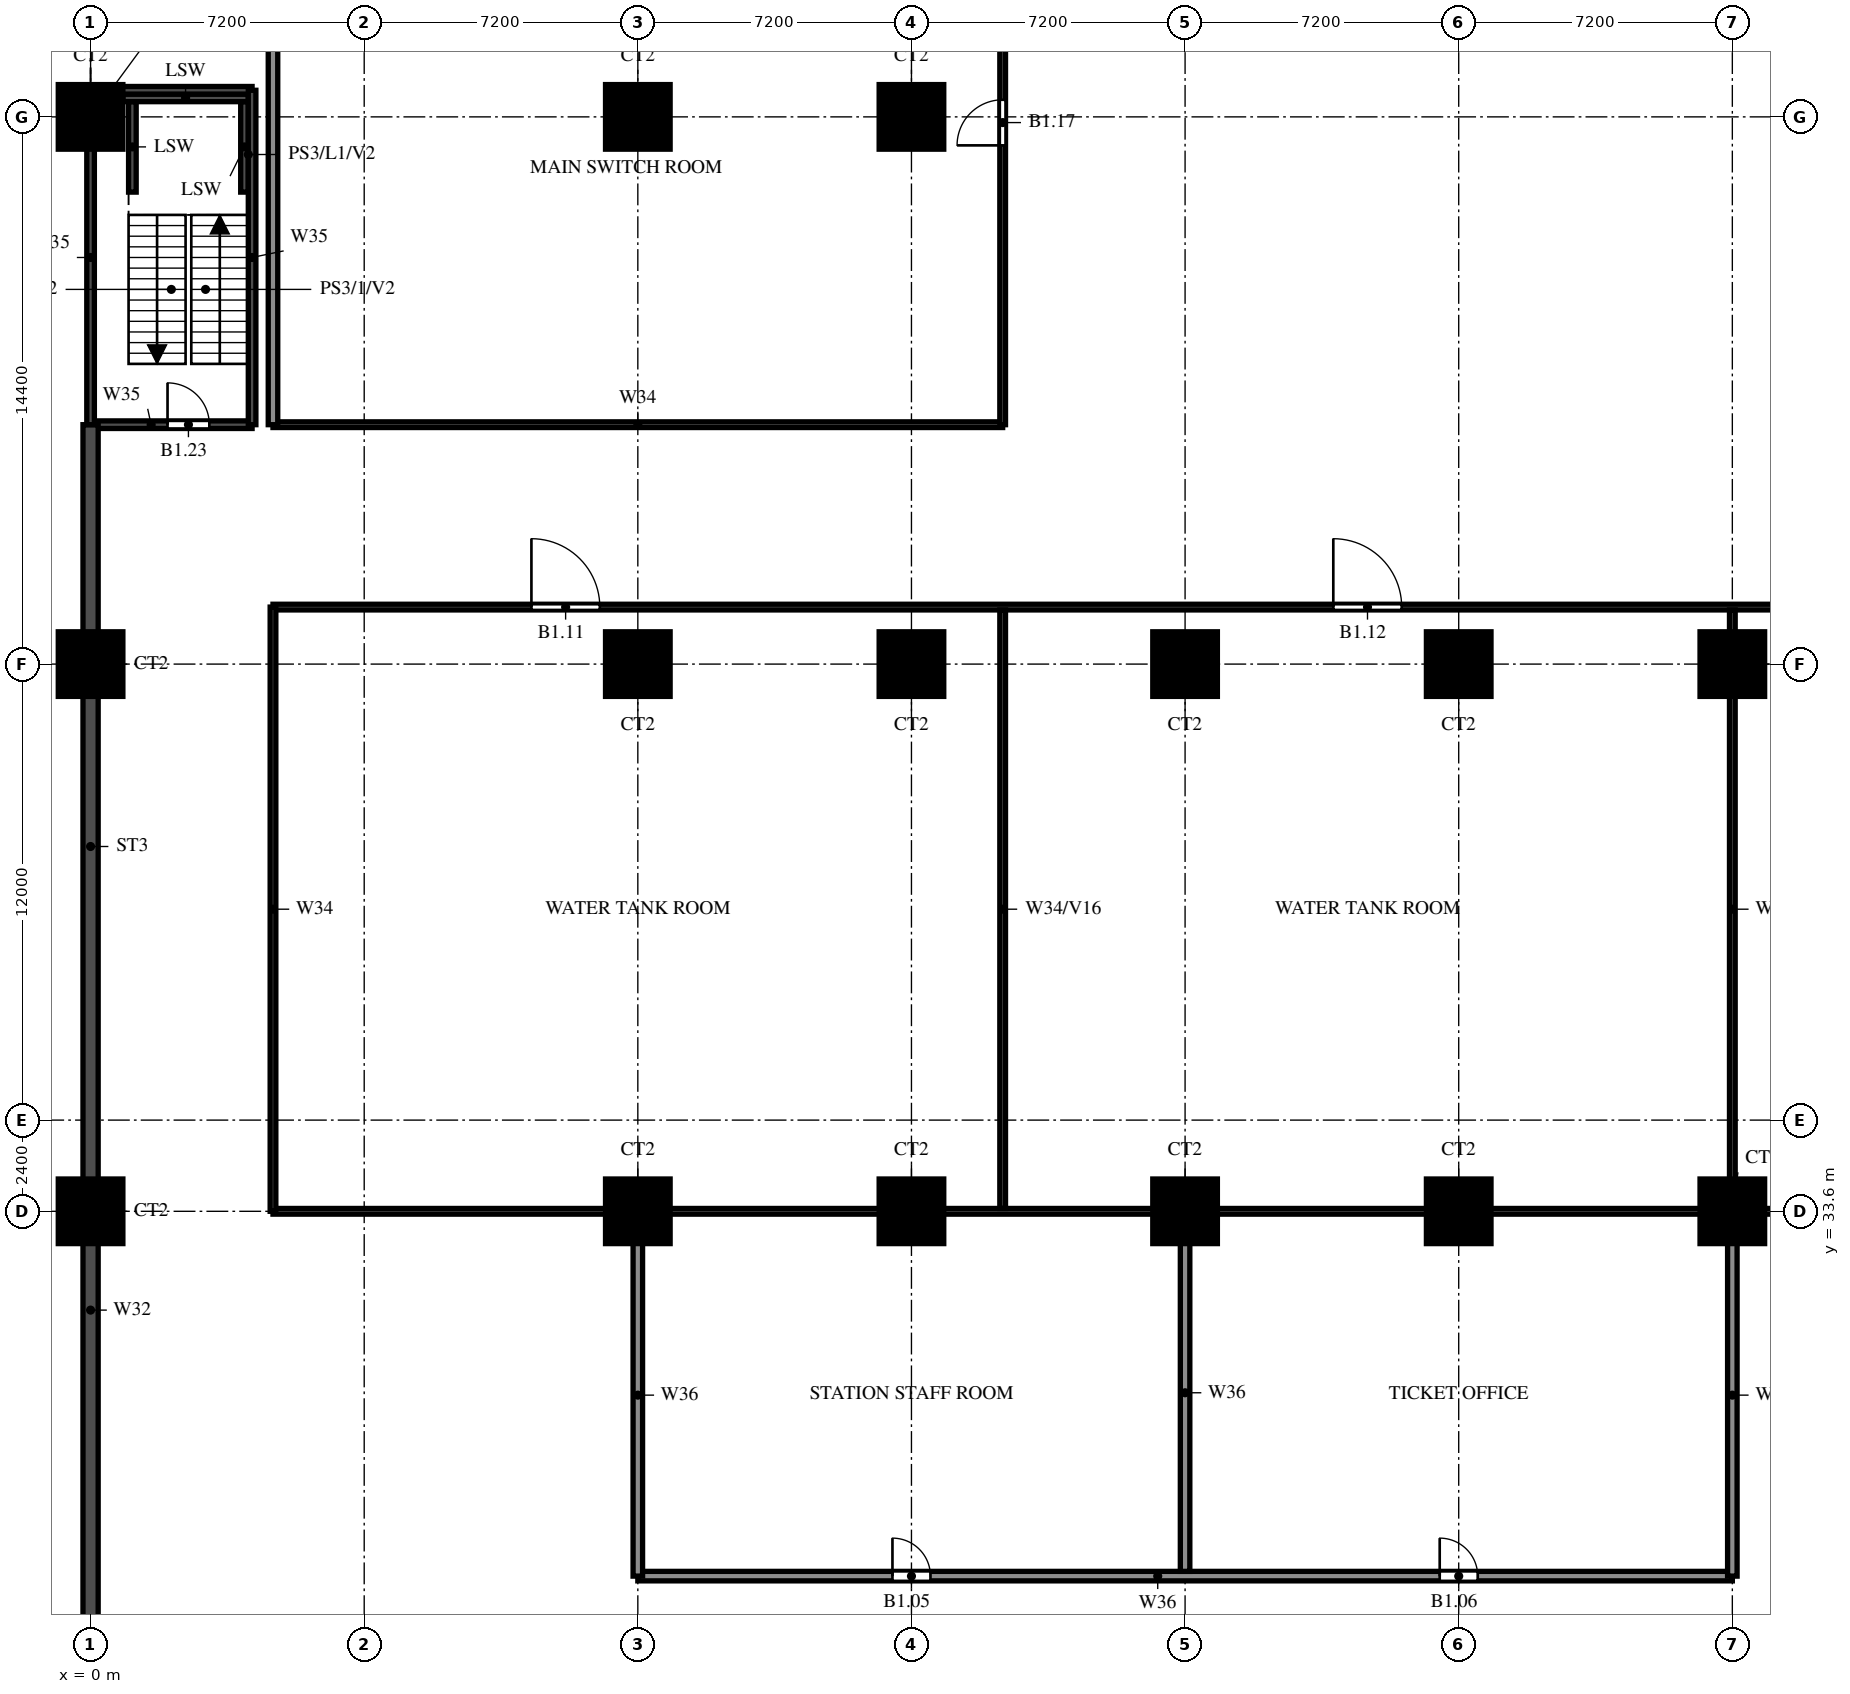
"""IFC4 building model, lengths in metres.
Left out: names, types, materials, properties, quantities, classifications, styles, units other than length and angle.
Written with IfcOpenShell. Run it as: python <this file> out.ifc"""

import sys

from ifc_helpers import new_model, si_unit, direction, frame, frame_2d, origin, origin_2d, place, context, subcontext, project, spatial, rectangle, extrude, source, transform, mapped, element, fill, save


model = new_model("IFC4")
c1 = context("Model", 3, precision=1e-05, world=origin(), true_north=direction((0.0, 1.0)))
c2 = subcontext(c1, "Body", "Model", "MODEL_VIEW")
j1 = project(units=[si_unit("LENGTHUNIT", "METRE"), si_unit("PLANEANGLEUNIT", "RADIAN")], contexts=[c1])
p1 = place(None, origin())
s1 = spatial("IfcSite", under=j1, at=p1, CompositionType="ELEMENT")
p2 = place(p1, origin())
s2 = spatial("IfcBuilding", under=s1, at=p2, CompositionType="ELEMENT")
p3 = place(p2, frame((0.0, 0.0, -5.4)))
s3 = spatial("IfcBuildingStorey", under=s2, at=p3, CompositionType="ELEMENT", Elevation=-5.4)
m1 = source(origin(), c2, "Body", "SweptSolid", [
    extrude(rectangle(XDim=1.7, YDim=1.7, at=origin_2d()), origin(), (0.0, 0.0, 1.0), 5.0),
])
for number, where, z_axis, x_axis in (
    (1, (0.0, 33.6, 0.0), (0.0, 0.0, 1.0), (1.0, 0.0, 0.0)),
    (2, (14.4, 33.6, 0.0), (0.0, 0.0, 1.0), (1.0, 0.0, 0.0)),
    (3, (21.6, 33.6, 0.0), (0.0, 0.0, 1.0), (1.0, 0.0, 0.0)),
    (4, (28.8, 33.6, 0.0), (0.0, 0.0, 1.0), (1.0, 0.0, 0.0)),
    (5, (36.0, 33.6, 0.0), (0.0, 0.0, 1.0), (1.0, 0.0, 0.0)),
    (6, (43.2, 33.6, 0.0), (0.0, 0.0, 1.0), (1.0, 0.0, 0.0)),
    (7, (0.0, 48.0, 0.0), (0.0, 0.0, 1.0), (1.0, 0.0, 0.0)),
    (8, (14.4, 48.0, 0.0), (0.0, 0.0, 1.0), (1.0, 0.0, 0.0)),
    (9, (21.6, 48.0, 0.0), (0.0, 0.0, 1.0), (1.0, 0.0, 0.0)),
    (10, (28.8, 48.0, 0.0), (0.0, 0.0, 1.0), (1.0, 0.0, 0.0)),
    (11, (36.0, 48.0, 0.0), (0.0, 0.0, 1.0), (1.0, 0.0, 0.0)),
    (12, (43.2, 48.0, 0.0), (0.0, 0.0, 1.0), (1.0, 0.0, 0.0)),
    (13, (0.0, 62.4, 0.0), (0.0, 0.0, 1.0), (1.0, 0.0, 0.0)),
    (14, (14.4, 62.4, 0.0), (0.0, 0.0, 1.0), (1.0, 0.0, 0.0)),
    (15, (21.6, 62.4, 0.0), (0.0, 0.0, 1.0), (1.0, 0.0, 0.0)),
):
    element("IfcColumn", number, at=place(p3, frame(where, z_axis=z_axis, x_axis=x_axis)), inside=s3, PredefinedType="COLUMN", context=c2, shape_type="MappedRepresentation", body=[
        mapped(m1, transform((0.0, 0.0, 0.0))),
    ])
for number, where, z_axis, x_axis in (
    (16, (1.1, 60.42, 0.0), (0.0, 0.0, 1.0), (0.0, 1.0, 0.0)),
    (17, (4.05, 60.42, 0.0), (0.0, 0.0, 1.0), (0.0, 1.0, 0.0)),
):
    element("IfcWall", number, at=place(p3, frame(where, z_axis=z_axis, x_axis=x_axis)), inside=s3, PredefinedType="SOLIDWALL", context=c2, shape_type="SweptSolid", body=[
        extrude(rectangle(XDim=2.38, YDim=0.2, at=frame_2d((1.19, 0.0))), origin(), (0.0, 0.0, 1.0), 2.5),
    ])
p4 = place(p3, frame((0.85, 62.9, 0.0), z_axis=(0.0, 0.0, 1.0), x_axis=(1.0, 0.0, 0.0)))
e18 = element("IfcWall", 18, at=p4, inside=s3, PredefinedType="SOLIDWALL", context=c2, shape_type="SweptSolid", body=[
    extrude(rectangle(XDim=3.3, YDim=0.2, at=frame_2d((1.65, 0.0))), origin(), (0.0, 0.0, 1.0), 2.5),
])
p5 = place(p3, frame((14.4, 24.0, 0.0), z_axis=(0.0, 0.0, 1.0), x_axis=(1.0, 0.0, 0.0)))
e19 = element("IfcWall", 19, at=p5, inside=s3, PredefinedType="SOLIDWALL", context=c2, shape_type="SweptSolid", body=[
    extrude(rectangle(XDim=28.8, YDim=0.25, at=frame_2d((14.4, 0.0))), origin(), (0.0, 0.0, 1.0), 3.8),
])
p6 = place(p5, frame((6.7, 0.0, 0.0)))
e20 = element("IfcOpeningElement", 20, at=p6, cuts=e19, PredefinedType="OPENING", context=c2, shape_type="SweptSolid", body=[
    extrude(rectangle(XDim=1.0, YDim=2.1, at=frame_2d((0.5, 1.05))), frame((0.0, 0.135, 0.0), z_axis=(0.0, -1.0, 0.0), x_axis=(1.0, 0.0, 0.0)), (0.0, 0.0, 1.0), 0.27),
])
p7 = place(p5, frame((21.1, 0.0, 0.0)))
e21 = element("IfcOpeningElement", 21, at=p7, cuts=e19, PredefinedType="OPENING", context=c2, shape_type="SweptSolid", body=[
    extrude(rectangle(XDim=1.0, YDim=2.1, at=frame_2d((0.5, 1.05))), frame((0.0, 0.135, 0.0), z_axis=(0.0, -1.0, 0.0), x_axis=(1.0, 0.0, 0.0)), (0.0, 0.0, 1.0), 0.27),
])
p8 = place(p3, frame((4.8, 33.6, 0.0), z_axis=(0.0, 0.0, 1.0), x_axis=(1.0, 0.0, 0.0)))
e22 = element("IfcWall", 22, at=p8, inside=s3, PredefinedType="PARTITIONING", context=c2, shape_type="SweptSolid", body=[
    extrude(rectangle(XDim=91.2, YDim=0.15, at=frame_2d((45.6, 0.0))), origin(), (0.0, 0.0, 1.0), 3.8),
])
p9 = place(p3, frame((4.8, 49.5, 0.0), z_axis=(0.0, 0.0, 1.0), x_axis=(1.0, 0.0, 0.0)))
e23 = element("IfcWall", 23, at=p9, inside=s3, PredefinedType="PARTITIONING", context=c2, shape_type="SweptSolid", body=[
    extrude(rectangle(XDim=91.2, YDim=0.15, at=frame_2d((45.6, 0.0))), origin(), (0.0, 0.0, 1.0), 3.8),
])
p10 = place(p9, frame((6.8, 0.0, 0.0)))
e24 = element("IfcOpeningElement", 24, at=p10, cuts=e23, PredefinedType="OPENING", context=c2, shape_type="SweptSolid", body=[
    extrude(rectangle(XDim=1.8, YDim=2.4, at=frame_2d((0.9, 1.2))), frame((0.0, 0.085, 0.0), z_axis=(0.0, -1.0, 0.0), x_axis=(1.0, 0.0, 0.0)), (0.0, 0.0, 1.0), 0.17),
])
p11 = place(p9, frame((27.9, 0.0, 0.0)))
e25 = element("IfcOpeningElement", 25, at=p11, cuts=e23, PredefinedType="OPENING", context=c2, shape_type="SweptSolid", body=[
    extrude(rectangle(XDim=1.8, YDim=2.4, at=frame_2d((0.9, 1.2))), frame((0.0, 0.085, 0.0), z_axis=(0.0, -1.0, 0.0), x_axis=(1.0, 0.0, 0.0)), (0.0, 0.0, 1.0), 0.17),
])
p12 = place(p9, frame((42.8, 0.0, 0.0)))
e26 = element("IfcOpeningElement", 26, at=p12, cuts=e23, PredefinedType="OPENING", context=c2, shape_type="SweptSolid", body=[
    extrude(rectangle(XDim=1.8, YDim=2.4, at=frame_2d((0.9, 1.2))), frame((0.0, 0.085, 0.0), z_axis=(0.0, -1.0, 0.0), x_axis=(1.0, 0.0, 0.0)), (0.0, 0.0, 1.0), 0.17),
])
p13 = place(p9, frame((57.2, 0.0, 0.0)))
e27 = element("IfcOpeningElement", 27, at=p13, cuts=e23, PredefinedType="OPENING", context=c2, shape_type="SweptSolid", body=[
    extrude(rectangle(XDim=1.8, YDim=2.4, at=frame_2d((0.9, 1.2))), frame((0.0, 0.085, 0.0), z_axis=(0.0, -1.0, 0.0), x_axis=(1.0, 0.0, 0.0)), (0.0, 0.0, 1.0), 0.17),
])
p14 = place(p9, frame((71.6, 0.0, 0.0)))
e28 = element("IfcOpeningElement", 28, at=p14, cuts=e23, PredefinedType="OPENING", context=c2, shape_type="SweptSolid", body=[
    extrude(rectangle(XDim=1.8, YDim=2.4, at=frame_2d((0.9, 1.2))), frame((0.0, 0.085, 0.0), z_axis=(0.0, -1.0, 0.0), x_axis=(1.0, 0.0, 0.0)), (0.0, 0.0, 1.0), 0.17),
])
p15 = place(p9, frame((85.5, 0.0, 0.0)))
e29 = element("IfcOpeningElement", 29, at=p15, cuts=e23, PredefinedType="OPENING", context=c2, shape_type="SweptSolid", body=[
    extrude(rectangle(XDim=1.8, YDim=2.4, at=frame_2d((0.9, 1.2))), frame((0.0, 0.085, 0.0), z_axis=(0.0, -1.0, 0.0), x_axis=(1.0, 0.0, 0.0)), (0.0, 0.0, 1.0), 0.17),
])
p16 = place(p3, frame((4.8, 54.3, 0.0), z_axis=(0.0, 0.0, 1.0), x_axis=(1.0, 0.0, 0.0)))
e30 = element("IfcWall", 30, at=p16, inside=s3, PredefinedType="PARTITIONING", context=c2, shape_type="SweptSolid", body=[
    extrude(rectangle(XDim=19.2, YDim=0.15, at=frame_2d((9.6, 0.0))), origin(), (0.0, 0.0, 1.0), 3.8),
])
p17 = place(p3, frame((0.0, 54.3, 0.0), z_axis=(0.0, 0.0, 1.0), x_axis=(1.0, 0.0, 0.0)))
e31 = element("IfcWall", 31, at=p17, inside=s3, PredefinedType="SOLIDWALL", context=c2, shape_type="SweptSolid", body=[
    extrude(rectangle(XDim=4.25, YDim=0.2, at=frame_2d((2.125, 0.0))), origin(), (0.0, 0.0, 1.0), 5.0),
])
p18 = place(p17, frame((2.025, 0.0, 0.0)))
e32 = element("IfcOpeningElement", 32, at=p18, cuts=e31, PredefinedType="OPENING", context=c2, shape_type="SweptSolid", body=[
    extrude(rectangle(XDim=1.1, YDim=2.1, at=frame_2d((0.55, 1.05))), frame((0.0, 0.11, 0.0), z_axis=(0.0, -1.0, 0.0), x_axis=(1.0, 0.0, 0.0)), (0.0, 0.0, 1.0), 0.22),
])
p19 = place(p3, frame((0.0, 63.1, 0.0), z_axis=(0.0, 0.0, 1.0), x_axis=(1.0, 0.0, 0.0)))
e33 = element("IfcWall", 33, at=p19, inside=s3, PredefinedType="SOLIDWALL", context=c2, shape_type="SweptSolid", body=[
    extrude(rectangle(XDim=4.25, YDim=0.2, at=frame_2d((2.125, 0.0))), origin(), (0.0, 0.0, 1.0), 5.0),
])
p20 = place(p3, frame((0.0, 7.7, 0.0), z_axis=(0.0, 0.0, 1.0), x_axis=(0.0, 1.0, 0.0)))
e34 = element("IfcWall", 34, at=p20, inside=s3, PredefinedType="SOLIDWALL", context=c2, shape_type="SweptSolid", body=[
    extrude(rectangle(XDim=46.6, YDim=0.4, at=frame_2d((23.3, 0.0))), origin(), (0.0, 0.0, 1.0), 5.0),
])
for number, where, z_axis, x_axis in (
    (35, (0.0, 54.3, 0.0), (0.0, 0.0, 1.0), (0.0, 1.0, 0.0)),
    (36, (4.25, 54.3, 0.0), (0.0, 0.0, 1.0), (0.0, 1.0, 0.0)),
):
    element("IfcWall", number, at=place(p3, frame(where, z_axis=z_axis, x_axis=x_axis)), inside=s3, PredefinedType="SOLIDWALL", context=c2, shape_type="SweptSolid", body=[
        extrude(rectangle(XDim=8.8, YDim=0.2, at=frame_2d((4.4, 0.0))), origin(), (0.0, 0.0, 1.0), 5.0),
    ])
p21 = place(p3, frame((4.8, 33.6, 0.0), z_axis=(0.0, 0.0, 1.0), x_axis=(0.0, 1.0, 0.0)))
e37 = element("IfcWall", 37, at=p21, inside=s3, PredefinedType="PARTITIONING", context=c2, shape_type="SweptSolid", body=[
    extrude(rectangle(XDim=15.9, YDim=0.15, at=frame_2d((7.95, 0.0))), origin(), (0.0, 0.0, 1.0), 3.8),
])
p22 = place(p3, frame((4.8, 54.3, 0.0), z_axis=(0.0, 0.0, 1.0), x_axis=(0.0, 1.0, 0.0)))
e38 = element("IfcWall", 38, at=p22, inside=s3, PredefinedType="SOLIDWALL", context=c2, shape_type="SweptSolid", body=[
    extrude(rectangle(XDim=32.1, YDim=0.25, at=frame_2d((16.05, 0.0))), origin(), (0.0, 0.0, 1.0), 2.2),
])
p23 = place(p3, frame((14.4, 24.0, 0.0), z_axis=(0.0, 0.0, 1.0), x_axis=(0.0, 1.0, 0.0)))
e39 = element("IfcWall", 39, at=p23, inside=s3, PredefinedType="SOLIDWALL", context=c2, shape_type="SweptSolid", body=[
    extrude(rectangle(XDim=9.525, YDim=0.25, at=frame_2d((4.762, 0.0))), origin(), (0.0, 0.0, 1.0), 3.8),
])
p24 = place(p3, frame((24.0, 33.675, 0.0), z_axis=(0.0, 0.0, 1.0), x_axis=(0.0, 1.0, 0.0)))
e40 = element("IfcWall", 40, at=p24, inside=s3, PredefinedType="PARTITIONING", context=c2, shape_type="SweptSolid", body=[
    extrude(rectangle(XDim=15.75, YDim=0.15, at=frame_2d((7.875, 0.0))), origin(), (0.0, 0.0, 1.0), 4.1),
])
p25 = place(p3, frame((24.0, 54.3, 0.0), z_axis=(0.0, 0.0, 1.0), x_axis=(0.0, 1.0, 0.0)))
e41 = element("IfcWall", 41, at=p25, inside=s3, PredefinedType="PARTITIONING", context=c2, shape_type="SweptSolid", body=[
    extrude(rectangle(XDim=31.9, YDim=0.15, at=frame_2d((15.95, 0.0))), origin(), (0.0, 0.0, 1.0), 3.8),
])
p26 = place(p25, frame((7.35, 0.0, 0.0)))
e42 = element("IfcOpeningElement", 42, at=p26, cuts=e41, PredefinedType="OPENING", context=c2, shape_type="SweptSolid", body=[
    extrude(rectangle(XDim=1.2, YDim=2.1, at=frame_2d((0.6, 1.05))), frame((0.0, 0.085, 0.0), z_axis=(0.0, -1.0, 0.0), x_axis=(1.0, 0.0, 0.0)), (0.0, 0.0, 1.0), 0.17),
])
p27 = place(p25, frame((23.4, 0.0, 0.0)))
e43 = element("IfcOpeningElement", 43, at=p27, cuts=e41, PredefinedType="OPENING", context=c2, shape_type="SweptSolid", body=[
    extrude(rectangle(XDim=1.2, YDim=2.1, at=frame_2d((0.6, 1.05))), frame((0.0, 0.085, 0.0), z_axis=(0.0, -1.0, 0.0), x_axis=(1.0, 0.0, 0.0)), (0.0, 0.0, 1.0), 0.17),
])
p28 = place(p3, frame((28.8, 24.125, 0.0), z_axis=(0.0, 0.0, 1.0), x_axis=(0.0, 1.0, 0.0)))
e44 = element("IfcWall", 44, at=p28, inside=s3, PredefinedType="SOLIDWALL", context=c2, shape_type="SweptSolid", body=[
    extrude(rectangle(XDim=9.4, YDim=0.25, at=frame_2d((4.7, 0.0))), origin(), (0.0, 0.0, 1.0), 3.8),
])
p29 = place(p3, frame((43.2, 33.675, 0.0), z_axis=(0.0, 0.0, 1.0), x_axis=(0.0, 1.0, 0.0)))
e45 = element("IfcWall", 45, at=p29, inside=s3, PredefinedType="PARTITIONING", context=c2, shape_type="SweptSolid", body=[
    extrude(rectangle(XDim=15.75, YDim=0.15, at=frame_2d((7.875, 0.0))), origin(), (0.0, 0.0, 1.0), 3.8),
])
p30 = place(p3, frame((43.2, 24.0, 0.0), z_axis=(0.0, 0.0, 1.0), x_axis=(0.0, 1.0, 0.0)))
e46 = element("IfcWall", 46, at=p30, inside=s3, PredefinedType="SOLIDWALL", context=c2, shape_type="SweptSolid", body=[
    extrude(rectangle(XDim=9.525, YDim=0.25, at=frame_2d((4.762, 0.0))), origin(), (0.0, 0.0, 1.0), 3.8),
])
p31 = place(p6, origin())
e47 = element("IfcDoor", 47, at=p31, inside=s3, OperationType="SINGLE_SWING_LEFT", PredefinedType="DOOR", context=c2, shape_type="SweptSolid", body=[
    extrude(rectangle(XDim=1.0, YDim=2.1, at=frame_2d((0.5, 1.05))), frame((0.0, 0.025, 0.0), z_axis=(0.0, -1.0, 0.0), x_axis=(1.0, 0.0, 0.0)), (0.0, 0.0, 1.0), 0.05),
])
fill(e20, e47)
p32 = place(p7, origin())
e48 = element("IfcDoor", 48, at=p32, inside=s3, OperationType="SINGLE_SWING_RIGHT", PredefinedType="DOOR", context=c2, shape_type="SweptSolid", body=[
    extrude(rectangle(XDim=1.0, YDim=2.1, at=frame_2d((0.5, 1.05))), frame((0.0, 0.025, 0.0), z_axis=(0.0, -1.0, 0.0), x_axis=(1.0, 0.0, 0.0)), (0.0, 0.0, 1.0), 0.05),
])
fill(e21, e48)
p33 = place(p10, origin())
e49 = element("IfcDoor", 49, at=p33, inside=s3, OperationType="DOUBLE_DOOR_SINGLE_SWING", PredefinedType="DOOR", context=c2, shape_type="SweptSolid", body=[
    extrude(rectangle(XDim=1.8, YDim=2.4, at=frame_2d((0.9, 1.2))), frame((0.0, 0.025, 0.0), z_axis=(0.0, -1.0, 0.0), x_axis=(1.0, 0.0, 0.0)), (0.0, 0.0, 1.0), 0.05),
])
fill(e24, e49)
p34 = place(p11, origin())
e50 = element("IfcDoor", 50, at=p34, inside=s3, OperationType="DOUBLE_DOOR_SINGLE_SWING", PredefinedType="DOOR", context=c2, shape_type="SweptSolid", body=[
    extrude(rectangle(XDim=1.8, YDim=2.4, at=frame_2d((0.9, 1.2))), frame((0.0, 0.025, 0.0), z_axis=(0.0, -1.0, 0.0), x_axis=(1.0, 0.0, 0.0)), (0.0, 0.0, 1.0), 0.05),
])
fill(e25, e50)
p35 = place(p26, origin())
e51 = element("IfcDoor", 51, at=p35, inside=s3, OperationType="SINGLE_SWING_LEFT", PredefinedType="DOOR", context=c2, shape_type="SweptSolid", body=[
    extrude(rectangle(XDim=1.2, YDim=2.1, at=frame_2d((0.6, 1.05))), frame((0.0, 0.025, 0.0), z_axis=(0.0, -1.0, 0.0), x_axis=(1.0, 0.0, 0.0)), (0.0, 0.0, 1.0), 0.05),
])
fill(e42, e51)
p36 = place(p18, origin())
e52 = element("IfcDoor", 52, at=p36, inside=s3, OperationType="SINGLE_SWING_RIGHT", PredefinedType="DOOR", context=c2, shape_type="SweptSolid", body=[
    extrude(rectangle(XDim=1.1, YDim=2.1, at=frame_2d((0.55, 1.05))), frame((0.0, 0.025, 0.0), z_axis=(0.0, -1.0, 0.0), x_axis=(1.0, 0.0, 0.0)), (0.0, 0.0, 1.0), 0.05),
])
fill(e32, e52)
save(model, sys.argv[1])
